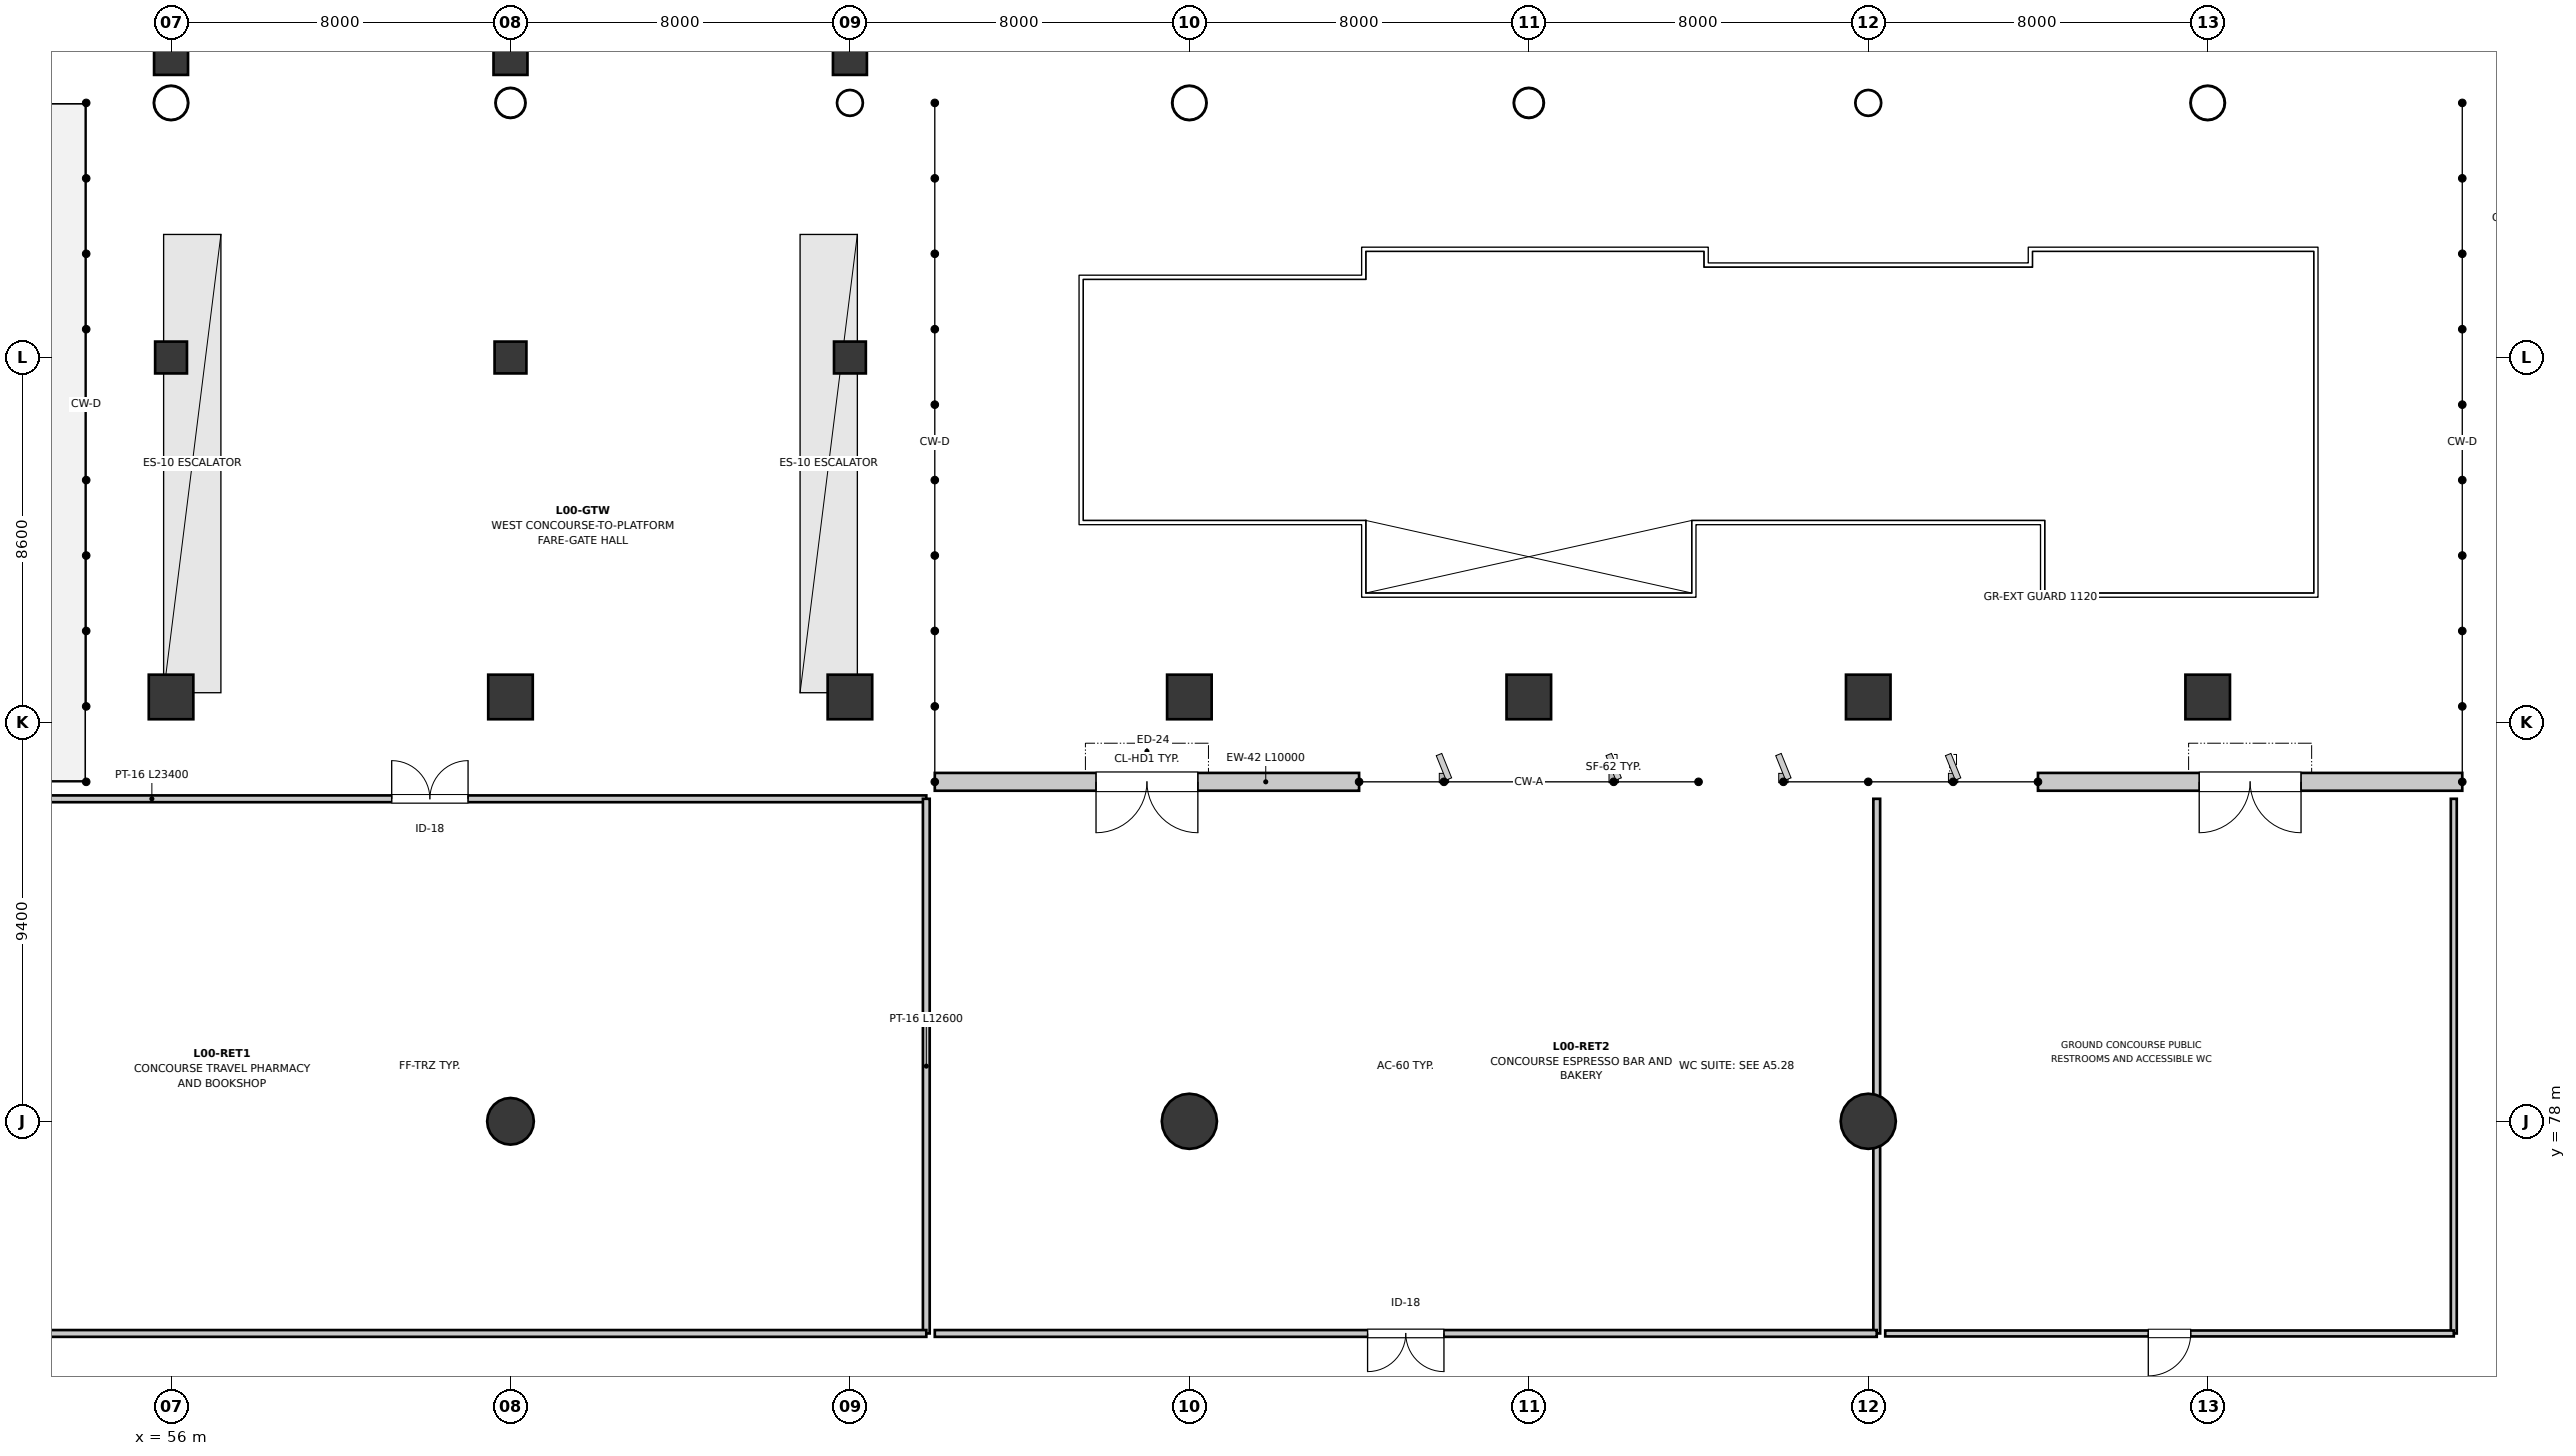
"""IFC4 building model, lengths in metres.
Left out: names, types, materials, properties, quantities, classifications, styles, units other than length and angle.
Written with IfcOpenShell. Run it as: python <this file> out.ifc"""

import sys

from ifc_helpers import new_model, si_unit, direction, frame, frame_2d, origin, origin_2d, place, context, subcontext, project, spatial, rectangle, circle, hollow_circle, extrude, element, fill, save


model = new_model("IFC4")
c1 = context("Model", 3, precision=1e-05, world=origin(), true_north=direction((0.0, 1.0)))
c2 = subcontext(c1, "Body", "Model", "MODEL_VIEW")
j1 = project(units=[si_unit("LENGTHUNIT", "METRE"), si_unit("PLANEANGLEUNIT", "RADIAN")], contexts=[c1])
p1 = place(None, origin())
s1 = spatial("IfcSite", under=j1, at=p1, CompositionType="ELEMENT")
p2 = place(p1, origin())
s2 = spatial("IfcBuilding", under=s1, at=p2, CompositionType="ELEMENT")
p3 = place(p2, origin())
s3 = spatial("IfcBuildingStorey", under=s2, at=p3, CompositionType="ELEMENT", Elevation=0.0)
p4 = place(p3, frame((56.0, 102.0, 0.0), z_axis=(0.0, 0.0, 1.0), x_axis=(1.0, 0.0, 0.0)))
e1 = element("IfcColumn", 1, at=p4, inside=s3, PredefinedType="COLUMN", context=c2, shape_type="SweptSolid", body=[
    extrude(hollow_circle(Radius=0.406, WallThickness=0.025, at=origin_2d()), origin(), (0.0, 0.0, 1.0), 6.0),
])
p5 = place(p3, frame((64.0, 102.0, 0.0), z_axis=(0.0, 0.0, 1.0), x_axis=(1.0, 0.0, 0.0)))
e2 = element("IfcColumn", 2, at=p5, inside=s3, PredefinedType="COLUMN", context=c2, shape_type="SweptSolid", body=[
    extrude(hollow_circle(Radius=0.355, WallThickness=0.025, at=origin_2d()), origin(), (0.0, 0.0, 1.0), 6.0),
])
p6 = place(p3, frame((72.0, 102.0, 0.0), z_axis=(0.0, 0.0, 1.0), x_axis=(1.0, 0.0, 0.0)))
e3 = element("IfcColumn", 3, at=p6, inside=s3, PredefinedType="COLUMN", context=c2, shape_type="SweptSolid", body=[
    extrude(hollow_circle(Radius=0.305, WallThickness=0.02, at=origin_2d()), origin(), (0.0, 0.0, 1.0), 6.0),
])
p7 = place(p3, frame((80.0, 102.0, 0.0), z_axis=(0.0, 0.0, 1.0), x_axis=(1.0, 0.0, 0.0)))
e4 = element("IfcColumn", 4, at=p7, inside=s3, PredefinedType="COLUMN", context=c2, shape_type="SweptSolid", body=[
    extrude(hollow_circle(Radius=0.406, WallThickness=0.025, at=origin_2d()), origin(), (0.0, 0.0, 1.0), 6.0),
])
p8 = place(p3, frame((88.0, 102.0, 0.0), z_axis=(0.0, 0.0, 1.0), x_axis=(1.0, 0.0, 0.0)))
e5 = element("IfcColumn", 5, at=p8, inside=s3, PredefinedType="COLUMN", context=c2, shape_type="SweptSolid", body=[
    extrude(hollow_circle(Radius=0.355, WallThickness=0.025, at=origin_2d()), origin(), (0.0, 0.0, 1.0), 6.0),
])
p9 = place(p3, frame((96.0, 102.0, 0.0), z_axis=(0.0, 0.0, 1.0), x_axis=(1.0, 0.0, 0.0)))
e6 = element("IfcColumn", 6, at=p9, inside=s3, PredefinedType="COLUMN", context=c2, shape_type="SweptSolid", body=[
    extrude(hollow_circle(Radius=0.305, WallThickness=0.02, at=origin_2d()), origin(), (0.0, 0.0, 1.0), 6.0),
])
p10 = place(p3, frame((104.0, 102.0, 0.0), z_axis=(0.0, 0.0, 1.0), x_axis=(1.0, 0.0, 0.0)))
e7 = element("IfcColumn", 7, at=p10, inside=s3, PredefinedType="COLUMN", context=c2, shape_type="SweptSolid", body=[
    extrude(hollow_circle(Radius=0.406, WallThickness=0.025, at=origin_2d()), origin(), (0.0, 0.0, 1.0), 6.0),
])
p11 = place(p3, frame((56.0, 88.0, 0.0), z_axis=(0.0, 0.0, 1.0), x_axis=(1.0, 0.0, 0.0)))
e8 = element("IfcColumn", 8, at=p11, inside=s3, PredefinedType="COLUMN", context=c2, shape_type="SweptSolid", body=[
    extrude(rectangle(XDim=1.05, YDim=1.05, at=origin_2d()), origin(), (0.0, 0.0, 1.0), 6.0),
])
p12 = place(p3, frame((64.0, 78.0, 0.0), z_axis=(0.0, 0.0, 1.0), x_axis=(1.0, 0.0, 0.0)))
e9 = element("IfcColumn", 9, at=p12, inside=s3, PredefinedType="COLUMN", context=c2, shape_type="SweptSolid", body=[
    extrude(circle(Radius=0.55, at=origin_2d()), origin(), (0.0, 0.0, 1.0), 6.0),
])
for number, where, z_axis, x_axis in (
    (10, (64.0, 88.0, 0.0), (0.0, 0.0, 1.0), (1.0, 0.0, 0.0)),
    (11, (72.0, 88.0, 0.0), (0.0, 0.0, 1.0), (1.0, 0.0, 0.0)),
):
    element("IfcColumn", number, at=place(p3, frame(where, z_axis=z_axis, x_axis=x_axis)), inside=s3, PredefinedType="COLUMN", context=c2, shape_type="SweptSolid", body=[
        extrude(rectangle(XDim=1.05, YDim=1.05, at=origin_2d()), origin(), (0.0, 0.0, 1.0), 6.0),
    ])
p13 = place(p3, frame((80.0, 78.0, 0.0), z_axis=(0.0, 0.0, 1.0), x_axis=(1.0, 0.0, 0.0)))
e12 = element("IfcColumn", 12, at=p13, inside=s3, PredefinedType="COLUMN", context=c2, shape_type="SweptSolid", body=[
    extrude(circle(Radius=0.65, at=origin_2d()), origin(), (0.0, 0.0, 1.0), 6.0),
])
for number, where, z_axis, x_axis in (
    (13, (80.0, 88.0, 0.0), (0.0, 0.0, 1.0), (1.0, 0.0, 0.0)),
    (14, (88.0, 88.0, 0.0), (0.0, 0.0, 1.0), (1.0, 0.0, 0.0)),
):
    element("IfcColumn", number, at=place(p3, frame(where, z_axis=z_axis, x_axis=x_axis)), inside=s3, PredefinedType="COLUMN", context=c2, shape_type="SweptSolid", body=[
        extrude(rectangle(XDim=1.05, YDim=1.05, at=origin_2d()), origin(), (0.0, 0.0, 1.0), 6.0),
    ])
p14 = place(p3, frame((96.0, 78.0, 0.0), z_axis=(0.0, 0.0, 1.0), x_axis=(1.0, 0.0, 0.0)))
e15 = element("IfcColumn", 15, at=p14, inside=s3, PredefinedType="COLUMN", context=c2, shape_type="SweptSolid", body=[
    extrude(circle(Radius=0.65, at=origin_2d()), origin(), (0.0, 0.0, 1.0), 6.0),
])
for number, where, z_axis, x_axis in (
    (16, (96.0, 88.0, 0.0), (0.0, 0.0, 1.0), (1.0, 0.0, 0.0)),
    (17, (104.0, 88.0, 0.0), (0.0, 0.0, 1.0), (1.0, 0.0, 0.0)),
):
    element("IfcColumn", number, at=place(p3, frame(where, z_axis=z_axis, x_axis=x_axis)), inside=s3, PredefinedType="COLUMN", context=c2, shape_type="SweptSolid", body=[
        extrude(rectangle(XDim=1.05, YDim=1.05, at=origin_2d()), origin(), (0.0, 0.0, 1.0), 6.0),
    ])
p15 = place(p3, frame((56.0, 96.0, 0.0), z_axis=(0.0, 0.0, 1.0), x_axis=(1.0, 0.0, 0.0)))
e18 = element("IfcColumn", 18, at=p15, inside=s3, PredefinedType="COLUMN", context=c2, shape_type="SweptSolid", body=[
    extrude(rectangle(XDim=0.75, YDim=0.75, at=origin_2d()), origin(), (0.0, 0.0, 1.0), 6.0),
])
p16 = place(p3, frame((56.0, 103.06, 0.0), z_axis=(0.0, 0.0, 1.0), x_axis=(1.0, 0.0, 0.0)))
e19 = element("IfcColumn", 19, at=p16, inside=s3, PredefinedType="COLUMN", context=c2, shape_type="SweptSolid", body=[
    extrude(rectangle(XDim=0.8, YDim=0.8, at=origin_2d()), origin(), (0.0, 0.0, 1.0), 5.64),
])
p17 = place(p3, frame((64.0, 96.0, 0.0), z_axis=(0.0, 0.0, 1.0), x_axis=(1.0, 0.0, 0.0)))
e20 = element("IfcColumn", 20, at=p17, inside=s3, PredefinedType="COLUMN", context=c2, shape_type="SweptSolid", body=[
    extrude(rectangle(XDim=0.75, YDim=0.75, at=origin_2d()), origin(), (0.0, 0.0, 1.0), 6.0),
])
p18 = place(p3, frame((64.0, 103.06, 0.0), z_axis=(0.0, 0.0, 1.0), x_axis=(1.0, 0.0, 0.0)))
e21 = element("IfcColumn", 21, at=p18, inside=s3, PredefinedType="COLUMN", context=c2, shape_type="SweptSolid", body=[
    extrude(rectangle(XDim=0.8, YDim=0.8, at=origin_2d()), origin(), (0.0, 0.0, 1.0), 5.64),
])
p19 = place(p3, frame((72.0, 96.0, 0.0), z_axis=(0.0, 0.0, 1.0), x_axis=(1.0, 0.0, 0.0)))
e22 = element("IfcColumn", 22, at=p19, inside=s3, PredefinedType="COLUMN", context=c2, shape_type="SweptSolid", body=[
    extrude(rectangle(XDim=0.75, YDim=0.75, at=origin_2d()), origin(), (0.0, 0.0, 1.0), 6.0),
])
p20 = place(p3, frame((72.0, 103.06, 0.0), z_axis=(0.0, 0.0, 1.0), x_axis=(1.0, 0.0, 0.0)))
e23 = element("IfcColumn", 23, at=p20, inside=s3, PredefinedType="COLUMN", context=c2, shape_type="SweptSolid", body=[
    extrude(rectangle(XDim=0.8, YDim=0.8, at=origin_2d()), origin(), (0.0, 0.0, 1.0), 5.64),
])
p21 = place(p3, frame((84.0, 86.0, 0.0), z_axis=(0.0, 0.0, 1.0), x_axis=(-1.0, 0.0, 0.0)))
e24 = element("IfcWall", 24, at=p21, inside=s3, PredefinedType="STANDARD", context=c2, shape_type="SweptSolid", body=[
    extrude(rectangle(XDim=10.0, YDim=0.42, at=frame_2d((5.0, 0.0))), origin(), (0.0, 0.0, 1.0), 4.625),
])
p22 = place(p21, frame((3.8, 0.0, 0.0)))
e25 = element("IfcOpeningElement", 25, at=p22, cuts=e24, PredefinedType="OPENING", context=c2, shape_type="SweptSolid", body=[
    extrude(rectangle(XDim=2.4, YDim=2.5, at=frame_2d((1.2, 1.25))), frame((0.0, 0.22, 0.0), z_axis=(0.0, -1.0, 0.0), x_axis=(1.0, 0.0, 0.0)), (0.0, 0.0, 1.0), 0.44),
])
p23 = place(p3, frame((110.0, 86.0, 0.0), z_axis=(0.0, 0.0, 1.0), x_axis=(-1.0, 0.0, 0.0)))
e26 = element("IfcWall", 26, at=p23, inside=s3, PredefinedType="STANDARD", context=c2, shape_type="SweptSolid", body=[
    extrude(rectangle(XDim=10.0, YDim=0.42, at=frame_2d((5.0, 0.0))), origin(), (0.0, 0.0, 1.0), 5.62),
])
p24 = place(p23, frame((3.8, 0.0, 0.0)))
e27 = element("IfcOpeningElement", 27, at=p24, cuts=e26, PredefinedType="OPENING", context=c2, shape_type="SweptSolid", body=[
    extrude(rectangle(XDim=2.4, YDim=2.5, at=frame_2d((1.2, 1.25))), frame((0.0, 0.22, 0.0), z_axis=(0.0, -1.0, 0.0), x_axis=(1.0, 0.0, 0.0)), (0.0, 0.0, 1.0), 0.44),
])
p25 = place(p3, frame((50.4, 85.6, 0.0), z_axis=(0.0, 0.0, 1.0), x_axis=(1.0, 0.0, 0.0)))
e28 = element("IfcWall", 28, at=p25, inside=s3, PredefinedType="PARTITIONING", context=c2, shape_type="SweptSolid", body=[
    extrude(rectangle(XDim=23.4, YDim=0.16, at=frame_2d((11.7, 0.0))), origin(), (0.0, 0.0, 1.0), 5.115),
])
p26 = place(p25, frame((10.8, 0.0, 0.0)))
e29 = element("IfcOpeningElement", 29, at=p26, cuts=e28, PredefinedType="OPENING", context=c2, shape_type="SweptSolid", body=[
    extrude(rectangle(XDim=1.8, YDim=2.25, at=frame_2d((0.9, 1.125))), frame((0.0, 0.09, 0.0), z_axis=(0.0, -1.0, 0.0), x_axis=(1.0, 0.0, 0.0)), (0.0, 0.0, 1.0), 0.18),
])
p27 = place(p3, frame((73.8, 85.6, 0.0), z_axis=(0.0, 0.0, 1.0), x_axis=(0.0, -1.0, 0.0)))
e30 = element("IfcWall", 30, at=p27, inside=s3, PredefinedType="PARTITIONING", context=c2, shape_type="SweptSolid", body=[
    extrude(rectangle(XDim=12.6, YDim=0.16, at=frame_2d((6.3, 0.0))), origin(), (0.0, 0.0, 1.0), 4.825),
])
p28 = place(p3, frame((73.8, 73.0, 0.0), z_axis=(0.0, 0.0, 1.0), x_axis=(-1.0, 0.0, 0.0)))
e31 = element("IfcWall", 31, at=p28, inside=s3, PredefinedType="PARTITIONING", context=c2, shape_type="SweptSolid", body=[
    extrude(rectangle(XDim=23.4, YDim=0.16, at=frame_2d((11.7, 0.0))), origin(), (0.0, 0.0, 1.0), 5.62),
])
p29 = place(p3, frame((96.2, 85.6, 0.0), z_axis=(0.0, 0.0, 1.0), x_axis=(0.0, -1.0, 0.0)))
e32 = element("IfcWall", 32, at=p29, inside=s3, PredefinedType="PARTITIONING", context=c2, shape_type="SweptSolid", body=[
    extrude(rectangle(XDim=12.6, YDim=0.16, at=frame_2d((6.3, 0.0))), origin(), (0.0, 0.0, 1.0), 4.625),
])
p30 = place(p3, frame((96.2, 73.0, 0.0), z_axis=(0.0, 0.0, 1.0), x_axis=(-1.0, 0.0, 0.0)))
e33 = element("IfcWall", 33, at=p30, inside=s3, PredefinedType="PARTITIONING", context=c2, shape_type="SweptSolid", body=[
    extrude(rectangle(XDim=22.2, YDim=0.16, at=frame_2d((11.1, 0.0))), origin(), (0.0, 0.0, 1.0), 5.125),
])
p31 = place(p30, frame((10.2, 0.0, 0.0)))
e34 = element("IfcOpeningElement", 34, at=p31, cuts=e33, PredefinedType="OPENING", context=c2, shape_type="SweptSolid", body=[
    extrude(rectangle(XDim=1.8, YDim=2.25, at=frame_2d((0.9, 1.125))), frame((0.0, 0.09, 0.0), z_axis=(0.0, -1.0, 0.0), x_axis=(1.0, 0.0, 0.0)), (0.0, 0.0, 1.0), 0.18),
])
p32 = place(p3, frame((109.8, 85.6, 0.0), z_axis=(0.0, 0.0, 1.0), x_axis=(0.0, -1.0, 0.0)))
e35 = element("IfcWall", 35, at=p32, inside=s3, PredefinedType="PARTITIONING", context=c2, shape_type="SweptSolid", body=[
    extrude(rectangle(XDim=12.6, YDim=0.14, at=frame_2d((6.3, 0.0))), origin(), (0.0, 0.0, 1.0), 4.935),
])
p33 = place(p3, frame((109.8, 73.0, 0.0), z_axis=(0.0, 0.0, 1.0), x_axis=(-1.0, 0.0, 0.0)))
e36 = element("IfcWall", 36, at=p33, inside=s3, PredefinedType="PARTITIONING", context=c2, shape_type="SweptSolid", body=[
    extrude(rectangle(XDim=13.4, YDim=0.14, at=frame_2d((6.7, 0.0))), origin(), (0.0, 0.0, 1.0), 5.62),
])
p34 = place(p33, frame((6.2, 0.0, 0.0)))
e37 = element("IfcOpeningElement", 37, at=p34, cuts=e36, PredefinedType="OPENING", context=c2, shape_type="SweptSolid", body=[
    extrude(rectangle(XDim=1.0, YDim=2.15, at=frame_2d((0.5, 1.075))), frame((0.0, 0.08, 0.0), z_axis=(0.0, -1.0, 0.0), x_axis=(1.0, 0.0, 0.0)), (0.0, 0.0, 1.0), 0.16),
])
p35 = place(p22, origin())
e38 = element("IfcDoor", 38, at=p35, inside=s3, OperationType="DOUBLE_DOOR_SINGLE_SWING", PredefinedType="DOOR", context=c2, shape_type="SweptSolid", body=[
    extrude(rectangle(XDim=2.4, YDim=2.5, at=frame_2d((1.2, 1.25))), frame((0.0, 0.025, 0.0), z_axis=(0.0, -1.0, 0.0), x_axis=(1.0, 0.0, 0.0)), (0.0, 0.0, 1.0), 0.05),
])
fill(e25, e38)
p36 = place(p24, origin())
e39 = element("IfcDoor", 39, at=p36, inside=s3, OperationType="DOUBLE_DOOR_SINGLE_SWING", PredefinedType="DOOR", context=c2, shape_type="SweptSolid", body=[
    extrude(rectangle(XDim=2.4, YDim=2.5, at=frame_2d((1.2, 1.25))), frame((0.0, 0.025, 0.0), z_axis=(0.0, -1.0, 0.0), x_axis=(1.0, 0.0, 0.0)), (0.0, 0.0, 1.0), 0.05),
])
fill(e27, e39)
p37 = place(p26, origin())
e40 = element("IfcDoor", 40, at=p37, inside=s3, OperationType="DOUBLE_DOOR_SINGLE_SWING", PredefinedType="DOOR", context=c2, shape_type="SweptSolid", body=[
    extrude(rectangle(XDim=1.8, YDim=2.25, at=frame_2d((0.9, 1.125))), frame((0.0, 0.025, 0.0), z_axis=(0.0, -1.0, 0.0), x_axis=(1.0, 0.0, 0.0)), (0.0, 0.0, 1.0), 0.05),
])
fill(e29, e40)
p38 = place(p31, origin())
e41 = element("IfcDoor", 41, at=p38, inside=s3, OperationType="DOUBLE_DOOR_SINGLE_SWING", PredefinedType="DOOR", context=c2, shape_type="SweptSolid", body=[
    extrude(rectangle(XDim=1.8, YDim=2.25, at=frame_2d((0.9, 1.125))), frame((0.0, 0.025, 0.0), z_axis=(0.0, -1.0, 0.0), x_axis=(1.0, 0.0, 0.0)), (0.0, 0.0, 1.0), 0.05),
])
fill(e34, e41)
p39 = place(p34, origin())
e42 = element("IfcDoor", 42, at=p39, inside=s3, OperationType="SINGLE_SWING_RIGHT", PredefinedType="DOOR", context=c2, shape_type="SweptSolid", body=[
    extrude(rectangle(XDim=1.0, YDim=2.15, at=frame_2d((0.5, 1.075))), frame((0.0, 0.025, 0.0), z_axis=(0.0, -1.0, 0.0), x_axis=(1.0, 0.0, 0.0)), (0.0, 0.0, 1.0), 0.05),
])
fill(e37, e42)
save(model, sys.argv[1])
